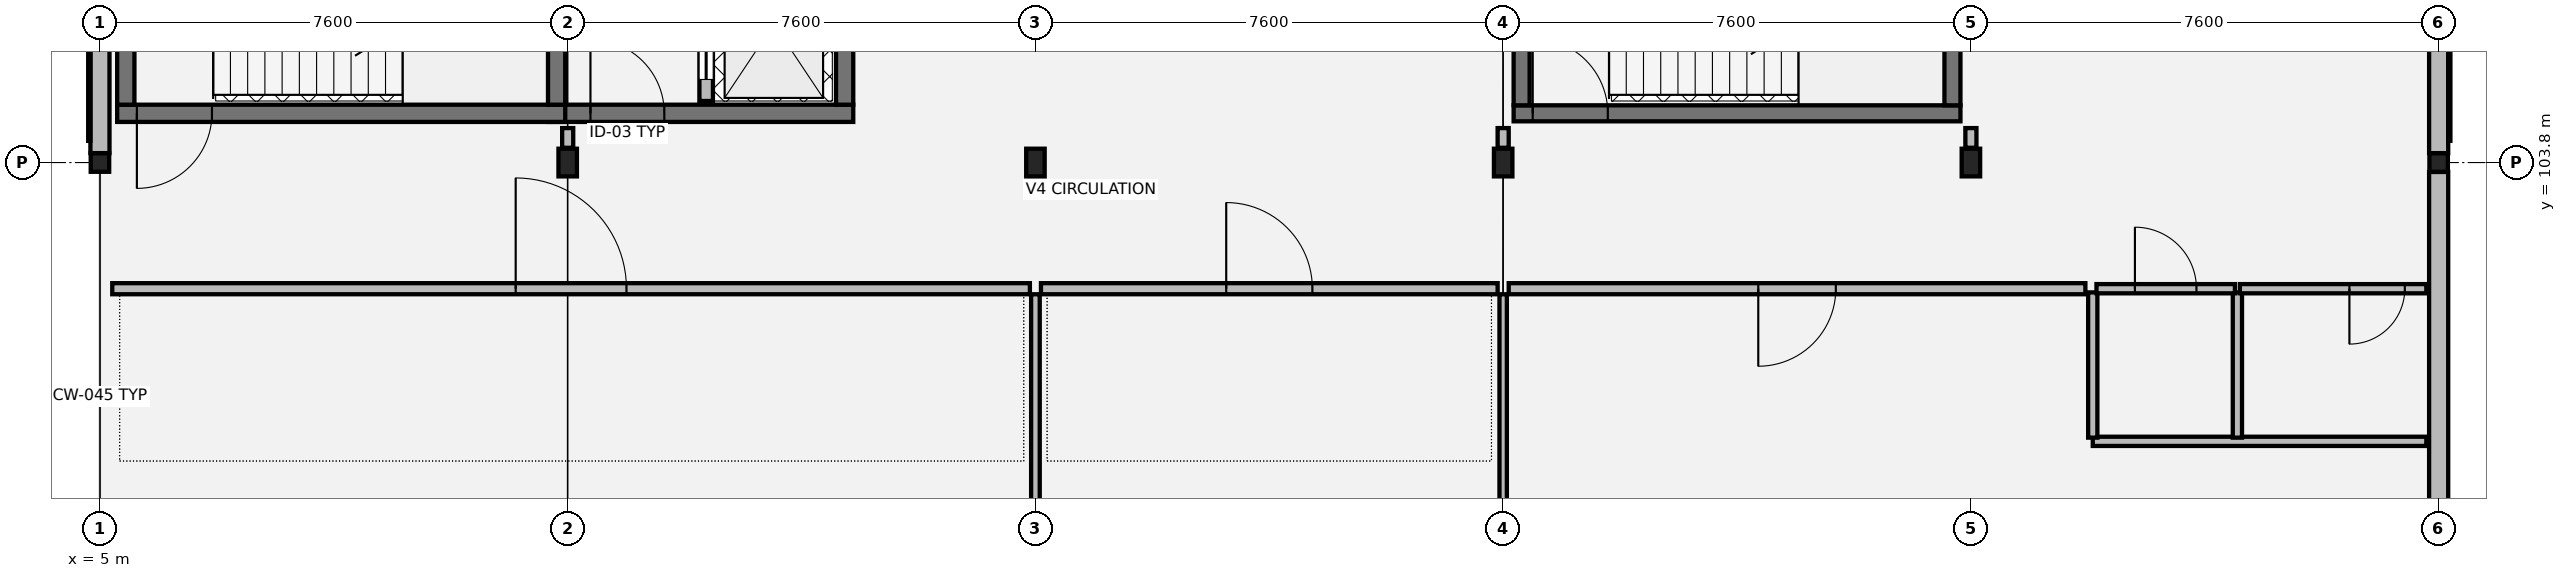
"""IFC4 building model, lengths in metres.
Left out: names, types, materials, properties, quantities, classifications, styles, units other than length and angle.
Written with IfcOpenShell. Run it as: python <this file> out.ifc"""

import sys

from ifc_helpers import new_model, si_unit, direction, frame, frame_2d, origin, origin_2d, place, context, subcontext, project, spatial, rectangle, hollow_rectangle, i_section, extrude, element, fill, save


model = new_model("IFC4")
c1 = context("Model", 3, precision=1e-05, world=origin(), true_north=direction((0.0, 1.0)))
c2 = subcontext(c1, "Body", "Model", "MODEL_VIEW")
j1 = project(units=[si_unit("LENGTHUNIT", "METRE"), si_unit("PLANEANGLEUNIT", "RADIAN")], contexts=[c1])
p1 = place(None, origin())
s1 = spatial("IfcSite", under=j1, at=p1, CompositionType="ELEMENT")
p2 = place(p1, origin())
s2 = spatial("IfcBuilding", under=s1, at=p2, CompositionType="ELEMENT")
p3 = place(p2, frame((0.0, 0.0, 5.1)))
s3 = spatial("IfcBuildingStorey", under=s2, at=p3, CompositionType="ELEMENT", Elevation=5.1)
p4 = place(p3, frame((5.0, 103.8, 0.0), z_axis=(0.0, 0.0, 1.0), x_axis=(1.0, 0.0, 0.0)))
e1 = element("IfcColumn", 1, at=p4, inside=s3, PredefinedType="COLUMN", context=c2, shape_type="SweptSolid", body=[
    extrude(hollow_rectangle(XDim=0.3, YDim=0.3, WallThickness=0.012, at=origin_2d()), origin(), (0.0, 0.0, 1.0), 4.055),
])
for number, where, z_axis, x_axis in (
    (2, (12.6, 103.8, 0.0), (0.0, 0.0, 1.0), (1.0, 0.0, 0.0)),
    (3, (20.2, 103.8, 0.0), (0.0, 0.0, 1.0), (1.0, 0.0, 0.0)),
    (4, (27.8, 103.8, 0.0), (0.0, 0.0, 1.0), (1.0, 0.0, 0.0)),
    (5, (35.4, 103.8, 0.0), (0.0, 0.0, 1.0), (1.0, 0.0, 0.0)),
):
    element("IfcColumn", number, at=place(p3, frame(where, z_axis=z_axis, x_axis=x_axis)), inside=s3, PredefinedType="COLUMN", context=c2, shape_type="SweptSolid", body=[
        extrude(i_section(OverallWidth=0.3, OverallDepth=0.45, WebThickness=0.014, FlangeThickness=0.026, at=origin_2d()), origin(), (0.0, 0.0, 1.0), 4.055),
    ])
p5 = place(p3, frame((43.0, 103.8, 0.0), z_axis=(0.0, 0.0, 1.0), x_axis=(1.0, 0.0, 0.0)))
e6 = element("IfcColumn", 6, at=p5, inside=s3, PredefinedType="COLUMN", context=c2, shape_type="SweptSolid", body=[
    extrude(hollow_rectangle(XDim=0.3, YDim=0.3, WallThickness=0.012, at=origin_2d()), origin(), (0.0, 0.0, 1.0), 4.055),
])
p6 = place(p3, frame((43.0, 96.353, 0.0), z_axis=(0.0, 0.0, 1.0), x_axis=(0.0, 1.0, 0.0)))
e7 = element("IfcWall", 7, at=p6, inside=s3, PredefinedType="SOLIDWALL", context=c2, shape_type="SweptSolid", body=[
    extrude(rectangle(XDim=7.294, YDim=0.31, at=frame_2d((3.647, 0.0))), origin(), (0.0, 0.0, 1.0), 3.48),
])
p7 = place(p3, frame((43.0, 103.953, 0.0), z_axis=(0.0, 0.0, 1.0), x_axis=(0.0, 1.0, 0.0)))
e8 = element("IfcWall", 8, at=p7, inside=s3, PredefinedType="SOLIDWALL", context=c2, shape_type="SweptSolid", body=[
    extrude(rectangle(XDim=7.294, YDim=0.31, at=frame_2d((3.647, 0.0))), origin(), (0.0, 0.0, 1.0), 3.48),
])
p8 = place(p7, frame((3.097, 0.0, 0.8)))
e9 = element("IfcOpeningElement", 9, at=p8, cuts=e8, PredefinedType="OPENING", context=c2, shape_type="SweptSolid", body=[
    extrude(rectangle(XDim=1.1, YDim=2.05, at=frame_2d((0.55, 1.025))), frame((0.0, 0.165, 0.0), z_axis=(0.0, -1.0, 0.0), x_axis=(1.0, 0.0, 0.0)), (0.0, 0.0, 1.0), 0.33),
])
p9 = place(p3, frame((5.0, 111.247, 0.0), z_axis=(0.0, 0.0, 1.0), x_axis=(0.0, -1.0, 0.0)))
e10 = element("IfcWall", 10, at=p9, inside=s3, PredefinedType="SOLIDWALL", context=c2, shape_type="SweptSolid", body=[
    extrude(rectangle(XDim=7.294, YDim=0.31, at=frame_2d((3.647, 0.0))), origin(), (0.0, 0.0, 1.0), 2.445),
])
p10 = place(p9, frame((3.097, 0.0, 0.295)))
e11 = element("IfcOpeningElement", 11, at=p10, cuts=e10, PredefinedType="OPENING", context=c2, shape_type="SweptSolid", body=[
    extrude(rectangle(XDim=1.1, YDim=2.05, at=frame_2d((0.55, 1.025))), frame((0.0, 0.165, 0.0), z_axis=(0.0, -1.0, 0.0), x_axis=(1.0, 0.0, 0.0)), (0.0, 0.0, 1.0), 0.33),
])
p11 = place(p3, frame((12.28, 104.6, 0.0), z_axis=(0.0, 0.0, 1.0), x_axis=(1.0, 0.0, 0.0)))
e12 = element("IfcWall", 12, at=p11, inside=s3, PredefinedType="SHEAR", context=c2, shape_type="SweptSolid", body=[
    extrude(rectangle(XDim=4.96, YDim=0.28, at=frame_2d((2.48, 0.0))), origin(), (0.0, 0.0, 1.0), 3.845),
])
p12 = place(p11, frame((0.69, 0.0, 0.0)))
e13 = element("IfcOpeningElement", 13, at=p12, cuts=e12, PredefinedType="OPENING", context=c2, shape_type="SweptSolid", body=[
    extrude(rectangle(XDim=1.2, YDim=2.16, at=frame_2d((0.6, 1.08))), frame((0.0, 0.15, 0.0), z_axis=(0.0, -1.0, 0.0), x_axis=(1.0, 0.0, 0.0)), (0.0, 0.0, 1.0), 0.3),
])
p13 = place(p3, frame((17.1, 104.74, 0.0), z_axis=(0.0, 0.0, 1.0), x_axis=(0.0, 1.0, 0.0)))
e14 = element("IfcWall", 14, at=p13, inside=s3, PredefinedType="SHEAR", context=c2, shape_type="SweptSolid", body=[
    extrude(rectangle(XDim=5.72, YDim=0.28, at=frame_2d((2.86, 0.0))), origin(), (0.0, 0.0, 1.0), 3.845),
])
p14 = place(p3, frame((14.85, 104.8, 0.0), z_axis=(0.0, 0.0, 1.0), x_axis=(0.0, 1.0, 0.0)))
e15 = element("IfcWall", 15, at=p14, inside=s3, PredefinedType="SOLIDWALL", context=c2, shape_type="SweptSolid", body=[
    extrude(rectangle(XDim=5.6, YDim=0.22, at=frame_2d((2.8, 0.0))), origin(), (0.0, 0.0, 1.0), 3.845),
])
p15 = place(p14, frame((0.35, 0.0, 0.0)))
e16 = element("IfcOpeningElement", 16, at=p15, cuts=e15, PredefinedType="OPENING", context=c2, shape_type="SweptSolid", body=[
    extrude(rectangle(XDim=1.1, YDim=2.15, at=frame_2d((0.55, 1.075))), frame((0.0, 0.12, 0.0), z_axis=(0.0, -1.0, 0.0), x_axis=(1.0, 0.0, 0.0)), (0.0, 0.0, 1.0), 0.24),
])
p16 = place(p3, frame((5.28, 104.6, 0.0), z_axis=(0.0, 0.0, 1.0), x_axis=(1.0, 0.0, 0.0)))
e17 = element("IfcWall", 17, at=p16, inside=s3, PredefinedType="SHEAR", context=c2, shape_type="SweptSolid", body=[
    extrude(rectangle(XDim=7.28, YDim=0.28, at=frame_2d((3.64, 0.0))), origin(), (0.0, 0.0, 1.0), 3.845),
])
p17 = place(p16, frame((0.32, 0.0, 0.0)))
e18 = element("IfcOpeningElement", 18, at=p17, cuts=e17, PredefinedType="OPENING", context=c2, shape_type="SweptSolid", body=[
    extrude(rectangle(XDim=1.22, YDim=2.18, at=frame_2d((0.61, 1.09))), frame((0.0, 0.15, 0.0), z_axis=(0.0, -1.0, 0.0), x_axis=(1.0, 0.0, 0.0)), (0.0, 0.0, 1.0), 0.3),
])
for number, where, z_axis, x_axis in (
    (19, (5.42, 104.74, 0.0), (0.0, 0.0, 1.0), (0.0, 1.0, 0.0)),
    (20, (12.42, 104.74, 0.0), (0.0, 0.0, 1.0), (0.0, 1.0, 0.0)),
):
    element("IfcWall", number, at=place(p3, frame(where, z_axis=z_axis, x_axis=x_axis)), inside=s3, PredefinedType="SHEAR", context=c2, shape_type="SweptSolid", body=[
        extrude(rectangle(XDim=5.72, YDim=0.28, at=frame_2d((2.86, 0.0))), origin(), (0.0, 0.0, 1.0), 3.845),
    ])
p18 = place(p3, frame((27.97, 104.6, 0.0), z_axis=(0.0, 0.0, 1.0), x_axis=(1.0, 0.0, 0.0)))
e21 = element("IfcWall", 21, at=p18, inside=s3, PredefinedType="SHEAR", context=c2, shape_type="SweptSolid", body=[
    extrude(rectangle(XDim=7.26, YDim=0.26, at=frame_2d((3.63, 0.0))), origin(), (0.0, 0.0, 1.0), 3.845),
])
p19 = place(p18, frame((0.31, 0.0, 0.0)))
e22 = element("IfcOpeningElement", 22, at=p19, cuts=e21, PredefinedType="OPENING", context=c2, shape_type="SweptSolid", body=[
    extrude(rectangle(XDim=1.22, YDim=2.18, at=frame_2d((0.61, 1.09))), frame((0.0, 0.14, 0.0), z_axis=(0.0, -1.0, 0.0), x_axis=(1.0, 0.0, 0.0)), (0.0, 0.0, 1.0), 0.28),
])
for number, where, z_axis, x_axis in (
    (23, (28.1, 104.73, 0.0), (0.0, 0.0, 1.0), (0.0, 1.0, 0.0)),
    (24, (35.1, 104.73, 0.0), (0.0, 0.0, 1.0), (0.0, 1.0, 0.0)),
):
    element("IfcWall", number, at=place(p3, frame(where, z_axis=z_axis, x_axis=x_axis)), inside=s3, PredefinedType="SHEAR", context=c2, shape_type="SweptSolid", body=[
        extrude(rectangle(XDim=5.74, YDim=0.26, at=frame_2d((2.87, 0.0))), origin(), (0.0, 0.0, 1.0), 3.845),
    ])
p20 = place(p3, frame((37.38, 99.27, 0.0), z_axis=(0.0, 0.0, 1.0), x_axis=(1.0, 0.0, 0.0)))
e25 = element("IfcWall", 25, at=p20, inside=s3, PredefinedType="PARTITIONING", context=c2, shape_type="SweptSolid", body=[
    extrude(rectangle(XDim=5.42, YDim=0.15, at=frame_2d((2.71, 0.0))), origin(), (0.0, 0.0, 1.0), 3.18),
])
for number, where, z_axis, x_axis in (
    (26, (37.38, 99.33, 0.0), (0.0, 0.0, 1.0), (0.0, 1.0, 0.0)),
    (27, (39.73, 99.33, 0.0), (0.0, 0.0, 1.0), (0.0, 1.0, 0.0)),
):
    element("IfcWall", number, at=place(p3, frame(where, z_axis=z_axis, x_axis=x_axis)), inside=s3, PredefinedType="PARTITIONING", context=c2, shape_type="SweptSolid", body=[
        extrude(rectangle(XDim=2.36, YDim=0.15, at=frame_2d((1.18, 0.0))), origin(), (0.0, 0.0, 1.0), 3.18),
    ])
p21 = place(p3, frame((37.44, 101.75, 0.0), z_axis=(0.0, 0.0, 1.0), x_axis=(1.0, 0.0, 0.0)))
e28 = element("IfcWall", 28, at=p21, inside=s3, PredefinedType="PARTITIONING", context=c2, shape_type="SweptSolid", body=[
    extrude(rectangle(XDim=2.25, YDim=0.15, at=frame_2d((1.125, 0.0))), origin(), (0.0, 0.0, 1.0), 3.18),
])
p22 = place(p21, frame((0.625, 0.0, 0.0)))
e29 = element("IfcOpeningElement", 29, at=p22, cuts=e28, PredefinedType="OPENING", context=c2, shape_type="SweptSolid", body=[
    extrude(rectangle(XDim=1.0, YDim=2.15, at=frame_2d((0.5, 1.075))), frame((0.0, 0.085, 0.0), z_axis=(0.0, -1.0, 0.0), x_axis=(1.0, 0.0, 0.0)), (0.0, 0.0, 1.0), 0.17),
])
p23 = place(p3, frame((39.77, 101.75, 0.0), z_axis=(0.0, 0.0, 1.0), x_axis=(1.0, 0.0, 0.0)))
e30 = element("IfcWall", 30, at=p23, inside=s3, PredefinedType="PARTITIONING", context=c2, shape_type="SweptSolid", body=[
    extrude(rectangle(XDim=3.03, YDim=0.15, at=frame_2d((1.515, 0.0))), origin(), (0.0, 0.0, 1.0), 3.18),
])
p24 = place(p23, frame((1.78, 0.0, 0.0)))
e31 = element("IfcOpeningElement", 31, at=p24, cuts=e30, PredefinedType="OPENING", context=c2, shape_type="SweptSolid", body=[
    extrude(rectangle(XDim=0.9, YDim=2.15, at=frame_2d((0.45, 1.075))), frame((0.0, 0.085, 0.0), z_axis=(0.0, -1.0, 0.0), x_axis=(1.0, 0.0, 0.0)), (0.0, 0.0, 1.0), 0.17),
])
p25 = place(p3, frame((5.2, 101.75, 0.0), z_axis=(0.0, 0.0, 1.0), x_axis=(1.0, 0.0, 0.0)))
e32 = element("IfcWall", 32, at=p25, inside=s3, PredefinedType="PARTITIONING", context=c2, shape_type="SweptSolid", body=[
    extrude(rectangle(XDim=14.91, YDim=0.18, at=frame_2d((7.455, 0.0))), origin(), (0.0, 0.0, 1.0), 3.18),
])
p26 = place(p25, frame((6.555, 0.0, 0.0)))
e33 = element("IfcOpeningElement", 33, at=p26, cuts=e32, PredefinedType="OPENING", context=c2, shape_type="SweptSolid", body=[
    extrude(rectangle(XDim=1.8, YDim=2.3, at=frame_2d((0.9, 1.15))), frame((0.0, 0.1, 0.0), z_axis=(0.0, -1.0, 0.0), x_axis=(1.0, 0.0, 0.0)), (0.0, 0.0, 1.0), 0.2),
])
p27 = place(p3, frame((20.29, 101.75, 0.0), z_axis=(0.0, 0.0, 1.0), x_axis=(1.0, 0.0, 0.0)))
e34 = element("IfcWall", 34, at=p27, inside=s3, PredefinedType="PARTITIONING", context=c2, shape_type="SweptSolid", body=[
    extrude(rectangle(XDim=7.42, YDim=0.18, at=frame_2d((3.71, 0.0))), origin(), (0.0, 0.0, 1.0), 3.18),
])
p28 = place(p27, frame((3.01, 0.0, 0.0)))
e35 = element("IfcOpeningElement", 35, at=p28, cuts=e34, PredefinedType="OPENING", context=c2, shape_type="SweptSolid", body=[
    extrude(rectangle(XDim=1.4, YDim=2.22, at=frame_2d((0.7, 1.11))), frame((0.0, 0.1, 0.0), z_axis=(0.0, -1.0, 0.0), x_axis=(1.0, 0.0, 0.0)), (0.0, 0.0, 1.0), 0.2),
])
p29 = place(p3, frame((27.89, 101.75, 0.0), z_axis=(0.0, 0.0, 1.0), x_axis=(1.0, 0.0, 0.0)))
e36 = element("IfcWall", 36, at=p29, inside=s3, PredefinedType="PARTITIONING", context=c2, shape_type="SweptSolid", body=[
    extrude(rectangle(XDim=9.37, YDim=0.18, at=frame_2d((4.685, 0.0))), origin(), (0.0, 0.0, 1.0), 3.18),
])
p30 = place(p29, frame((4.055, 0.0, 0.0)))
e37 = element("IfcOpeningElement", 37, at=p30, cuts=e36, PredefinedType="OPENING", context=c2, shape_type="SweptSolid", body=[
    extrude(rectangle(XDim=1.26, YDim=2.2, at=frame_2d((0.63, 1.1))), frame((0.0, 0.1, 0.0), z_axis=(0.0, -1.0, 0.0), x_axis=(1.0, 0.0, 0.0)), (0.0, 0.0, 1.0), 0.2),
])
for number, where, z_axis, x_axis in (
    (38, (12.6, 104.04, 0.0), (0.0, 0.0, 1.0), (0.0, 1.0, 0.0)),
    (39, (27.8, 104.04, 0.0), (0.0, 0.0, 1.0), (0.0, 1.0, 0.0)),
    (40, (35.4, 104.04, 0.0), (0.0, 0.0, 1.0), (0.0, 1.0, 0.0)),
):
    element("IfcWall", number, at=place(p3, frame(where, z_axis=z_axis, x_axis=x_axis)), inside=s3, PredefinedType="PARTITIONING", context=c2, shape_type="SweptSolid", body=[
        extrude(rectangle(XDim=0.32, YDim=0.18, at=frame_2d((0.16, 0.0))), origin(), (0.0, 0.0, 1.0), 3.18),
    ])
p31 = place(p3, frame((20.2, 93.95, 0.0), z_axis=(0.0, 0.0, 1.0), x_axis=(0.0, 1.0, 0.0)))
e41 = element("IfcWall", 41, at=p31, inside=s3, PredefinedType="PARTITIONING", context=c2, shape_type="SweptSolid", body=[
    extrude(rectangle(XDim=7.71, YDim=0.14, at=frame_2d((3.855, 0.0))), origin(), (0.0, 0.0, 1.0), 3.18),
])
p32 = place(p3, frame((27.8, 73.72, 0.0), z_axis=(0.0, 0.0, 1.0), x_axis=(0.0, 1.0, 0.0)))
e42 = element("IfcWall", 42, at=p32, inside=s3, PredefinedType="PARTITIONING", context=c2, shape_type="SweptSolid", body=[
    extrude(rectangle(XDim=27.94, YDim=0.12, at=frame_2d((13.97, 0.0))), origin(), (0.0, 0.0, 1.0), 3.18),
])
p33 = place(p12, origin())
e43 = element("IfcDoor", 43, at=p33, inside=s3, OperationType="SINGLE_SWING_LEFT", PredefinedType="DOOR", context=c2, shape_type="SweptSolid", body=[
    extrude(rectangle(XDim=1.2, YDim=2.16, at=frame_2d((0.6, 1.08))), frame((0.0, 0.025, 0.0), z_axis=(0.0, -1.0, 0.0), x_axis=(1.0, 0.0, 0.0)), (0.0, 0.0, 1.0), 0.05),
])
fill(e13, e43)
p34 = place(p15, origin())
e44 = element("IfcDoor", 44, at=p34, inside=s3, OperationType="SLIDING_TO_LEFT", PredefinedType="DOOR", context=c2, shape_type="SweptSolid", body=[
    extrude(rectangle(XDim=1.1, YDim=2.15, at=frame_2d((0.55, 1.075))), frame((0.0, 0.025, 0.0), z_axis=(0.0, -1.0, 0.0), x_axis=(1.0, 0.0, 0.0)), (0.0, 0.0, 1.0), 0.05),
])
fill(e16, e44)
p35 = place(p17, origin())
e45 = element("IfcDoor", 45, at=p35, inside=s3, OperationType="SINGLE_SWING_RIGHT", PredefinedType="DOOR", context=c2, shape_type="SweptSolid", body=[
    extrude(rectangle(XDim=1.22, YDim=2.18, at=frame_2d((0.61, 1.09))), frame((0.0, 0.025, 0.0), z_axis=(0.0, -1.0, 0.0), x_axis=(1.0, 0.0, 0.0)), (0.0, 0.0, 1.0), 0.05),
])
fill(e18, e45)
p36 = place(p19, origin())
e46 = element("IfcDoor", 46, at=p36, inside=s3, OperationType="SINGLE_SWING_LEFT", PredefinedType="DOOR", context=c2, shape_type="SweptSolid", body=[
    extrude(rectangle(XDim=1.22, YDim=2.18, at=frame_2d((0.61, 1.09))), frame((0.0, 0.025, 0.0), z_axis=(0.0, -1.0, 0.0), x_axis=(1.0, 0.0, 0.0)), (0.0, 0.0, 1.0), 0.05),
])
fill(e22, e46)
p37 = place(p22, origin())
e47 = element("IfcDoor", 47, at=p37, inside=s3, OperationType="SINGLE_SWING_LEFT", PredefinedType="DOOR", context=c2, shape_type="SweptSolid", body=[
    extrude(rectangle(XDim=1.0, YDim=2.15, at=frame_2d((0.5, 1.075))), frame((0.0, 0.025, 0.0), z_axis=(0.0, -1.0, 0.0), x_axis=(1.0, 0.0, 0.0)), (0.0, 0.0, 1.0), 0.05),
])
fill(e29, e47)
p38 = place(p24, origin())
e48 = element("IfcDoor", 48, at=p38, inside=s3, OperationType="SINGLE_SWING_RIGHT", PredefinedType="DOOR", context=c2, shape_type="SweptSolid", body=[
    extrude(rectangle(XDim=0.9, YDim=2.15, at=frame_2d((0.45, 1.075))), frame((0.0, 0.025, 0.0), z_axis=(0.0, -1.0, 0.0), x_axis=(1.0, 0.0, 0.0)), (0.0, 0.0, 1.0), 0.05),
])
fill(e31, e48)
p39 = place(p26, origin())
e49 = element("IfcDoor", 49, at=p39, inside=s3, OperationType="DOUBLE_DOOR_SINGLE_SWING", PredefinedType="DOOR", context=c2, shape_type="SweptSolid", body=[
    extrude(rectangle(XDim=1.8, YDim=2.3, at=frame_2d((0.9, 1.15))), frame((0.0, 0.025, 0.0), z_axis=(0.0, -1.0, 0.0), x_axis=(1.0, 0.0, 0.0)), (0.0, 0.0, 1.0), 0.05),
])
fill(e33, e49)
p40 = place(p28, origin())
e50 = element("IfcDoor", 50, at=p40, inside=s3, OperationType="SINGLE_SWING_LEFT", PredefinedType="DOOR", context=c2, shape_type="SweptSolid", body=[
    extrude(rectangle(XDim=1.4, YDim=2.22, at=frame_2d((0.7, 1.11))), frame((0.0, 0.025, 0.0), z_axis=(0.0, -1.0, 0.0), x_axis=(1.0, 0.0, 0.0)), (0.0, 0.0, 1.0), 0.05),
])
fill(e35, e50)
p41 = place(p30, origin())
e51 = element("IfcDoor", 51, at=p41, inside=s3, OperationType="SINGLE_SWING_RIGHT", PredefinedType="DOOR", context=c2, shape_type="SweptSolid", body=[
    extrude(rectangle(XDim=1.26, YDim=2.2, at=frame_2d((0.63, 1.1))), frame((0.0, 0.025, 0.0), z_axis=(0.0, -1.0, 0.0), x_axis=(1.0, 0.0, 0.0)), (0.0, 0.0, 1.0), 0.05),
])
fill(e37, e51)
save(model, sys.argv[1])
